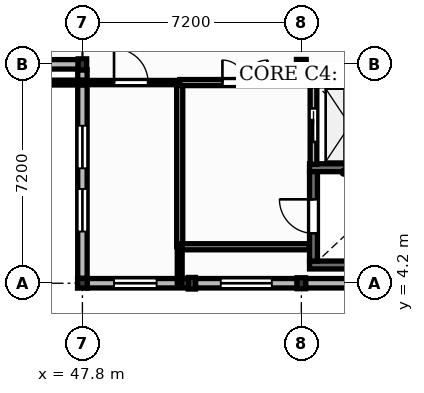
"""IFC4 building model, lengths in metres.
Left out: names, types, materials, properties, quantities, classifications, styles, units other than length and angle.
Written with IfcOpenShell. Run it as: python <this file> out.ifc"""

import sys

from ifc_helpers import new_model, si_unit, direction, frame, frame_2d, origin, origin_2d, place, context, subcontext, project, spatial, rectangle, extrude, element, fill, save


model = new_model("IFC4")
c1 = context("Model", 3, precision=1e-05, world=origin(), true_north=direction((0.0, 1.0)))
c2 = subcontext(c1, "Body", "Model", "MODEL_VIEW")
j1 = project(units=[si_unit("LENGTHUNIT", "METRE"), si_unit("PLANEANGLEUNIT", "RADIAN")], contexts=[c1])
p1 = place(None, origin())
s1 = spatial("IfcSite", under=j1, at=p1, CompositionType="ELEMENT")
p2 = place(p1, origin())
s2 = spatial("IfcBuilding", under=s1, at=p2, CompositionType="ELEMENT")
p3 = place(p2, frame((0.0, 0.0, 9.0)))
s3 = spatial("IfcBuildingStorey", under=s2, at=p3, CompositionType="ELEMENT", Elevation=9.0)
p4 = place(p3, frame((47.8, 4.2, 0.0), z_axis=(0.0, 0.0, 1.0), x_axis=(1.0, 0.0, 0.0)))
e1 = element("IfcColumn", 1, at=p4, inside=s3, PredefinedType="COLUMN", context=c2, shape_type="SweptSolid", body=[
    extrude(rectangle(XDim=0.32, YDim=0.32, at=origin_2d()), origin(), (0.0, 0.0, 1.0), 3.99),
])
p5 = place(p3, frame((47.8, 11.4, 0.0), z_axis=(0.0, 0.0, 1.0), x_axis=(1.0, 0.0, 0.0)))
e2 = element("IfcColumn", 2, at=p5, inside=s3, PredefinedType="COLUMN", context=c2, shape_type="SweptSolid", body=[
    extrude(rectangle(XDim=0.28, YDim=0.36, at=origin_2d()), origin(), (0.0, 0.0, 1.0), 3.98),
])
p6 = place(p3, frame((55.0, 4.2, 0.0), z_axis=(0.0, 0.0, 1.0), x_axis=(1.0, 0.0, 0.0)))
e3 = element("IfcColumn", 3, at=p6, inside=s3, PredefinedType="COLUMN", context=c2, shape_type="SweptSolid", body=[
    extrude(rectangle(XDim=0.28, YDim=0.36, at=origin_2d()), origin(), (0.0, 0.0, 1.0), 3.99),
])
p7 = place(p3, frame((55.0, 11.4, 0.0), z_axis=(0.0, 0.0, 1.0), x_axis=(1.0, 0.0, 0.0)))
e4 = element("IfcColumn", 4, at=p7, inside=s3, PredefinedType="COLUMN", context=c2, shape_type="SweptSolid", body=[
    extrude(rectangle(XDim=0.32, YDim=0.32, at=origin_2d()), origin(), (0.0, 0.0, 1.0), 3.99),
])
p8 = place(p3, frame((51.4, 4.2, 0.0), z_axis=(0.0, 0.0, 1.0), x_axis=(1.0, 0.0, 0.0)))
e5 = element("IfcColumn", 5, at=p8, inside=s3, PredefinedType="PILASTER", context=c2, shape_type="SweptSolid", body=[
    extrude(rectangle(XDim=0.24, YDim=0.38, at=origin_2d()), origin(), (0.0, 0.0, 1.0), 3.99),
])
p9 = place(p3, frame((40.76, 11.4, 0.0), z_axis=(0.0, 0.0, 1.0), x_axis=(1.0, 0.0, 0.0)))
e6 = element("IfcWall", 6, at=p9, inside=s3, PredefinedType="SOLIDWALL", context=c2, shape_type="SweptSolid", body=[
    extrude(rectangle(XDim=6.9, YDim=0.31, at=frame_2d((3.45, 0.0))), origin(), (0.0, 0.0, 1.0), 3.49),
])
p10 = place(p9, frame((1.45, 0.0, 1.0)))
e7 = element("IfcOpeningElement", 7, at=p10, cuts=e6, PredefinedType="OPENING", context=c2, shape_type="SweptSolid", body=[
    extrude(rectangle(XDim=1.66, YDim=1.8, at=frame_2d((0.83, 0.9))), frame((0.0, 0.165, 0.0), z_axis=(0.0, -1.0, 0.0), x_axis=(1.0, 0.0, 0.0)), (0.0, 0.0, 1.0), 0.33),
])
p11 = place(p9, frame((3.79, 0.0, 1.0)))
e8 = element("IfcOpeningElement", 8, at=p11, cuts=e6, PredefinedType="OPENING", context=c2, shape_type="SweptSolid", body=[
    extrude(rectangle(XDim=1.66, YDim=1.8, at=frame_2d((0.83, 0.9))), frame((0.0, 0.165, 0.0), z_axis=(0.0, -1.0, 0.0), x_axis=(1.0, 0.0, 0.0)), (0.0, 0.0, 1.0), 0.33),
])
p12 = place(p3, frame((47.96, 4.2, 0.0), z_axis=(0.0, 0.0, 1.0), x_axis=(1.0, 0.0, 0.0)))
e9 = element("IfcWall", 9, at=p12, inside=s3, PredefinedType="SOLIDWALL", context=c2, shape_type="SweptSolid", body=[
    extrude(rectangle(XDim=3.32, YDim=0.31, at=frame_2d((1.66, 0.0))), origin(), (0.0, 0.0, 1.0), 3.53),
])
p13 = place(p12, frame((0.88, 0.0, 1.05)))
e10 = element("IfcOpeningElement", 10, at=p13, cuts=e9, PredefinedType="OPENING", context=c2, shape_type="SweptSolid", body=[
    extrude(rectangle(XDim=1.4, YDim=1.65, at=frame_2d((0.7, 0.825))), frame((0.0, 0.165, 0.0), z_axis=(0.0, -1.0, 0.0), x_axis=(1.0, 0.0, 0.0)), (0.0, 0.0, 1.0), 0.33),
])
p14 = place(p3, frame((51.52, 4.2, 0.0), z_axis=(0.0, 0.0, 1.0), x_axis=(1.0, 0.0, 0.0)))
e11 = element("IfcWall", 11, at=p14, inside=s3, PredefinedType="SOLIDWALL", context=c2, shape_type="SweptSolid", body=[
    extrude(rectangle(XDim=3.34, YDim=0.31, at=frame_2d((1.67, 0.0))), origin(), (0.0, 0.0, 1.0), 3.53),
])
p15 = place(p14, frame((0.83, 0.0, 1.5)))
e12 = element("IfcOpeningElement", 12, at=p15, cuts=e11, PredefinedType="OPENING", context=c2, shape_type="SweptSolid", body=[
    extrude(rectangle(XDim=1.68, YDim=1.25, at=frame_2d((0.84, 0.625))), frame((0.0, 0.165, 0.0), z_axis=(0.0, -1.0, 0.0), x_axis=(1.0, 0.0, 0.0)), (0.0, 0.0, 1.0), 0.33),
])
p16 = place(p3, frame((47.8, 4.36, 0.0), z_axis=(0.0, 0.0, 1.0), x_axis=(0.0, 1.0, 0.0)))
e13 = element("IfcWall", 13, at=p16, inside=s3, PredefinedType="SOLIDWALL", context=c2, shape_type="SweptSolid", body=[
    extrude(rectangle(XDim=6.86, YDim=0.31, at=frame_2d((3.43, 0.0))), origin(), (0.0, 0.0, 1.0), 3.52),
])
p17 = place(p16, frame((1.54, 0.0, 1.05)))
e14 = element("IfcOpeningElement", 14, at=p17, cuts=e13, PredefinedType="OPENING", context=c2, shape_type="SweptSolid", body=[
    extrude(rectangle(XDim=1.4, YDim=1.65, at=frame_2d((0.7, 0.825))), frame((0.0, 0.165, 0.0), z_axis=(0.0, -1.0, 0.0), x_axis=(1.0, 0.0, 0.0)), (0.0, 0.0, 1.0), 0.33),
])
p18 = place(p16, frame((3.62, 0.0, 1.05)))
e15 = element("IfcOpeningElement", 15, at=p18, cuts=e13, PredefinedType="OPENING", context=c2, shape_type="SweptSolid", body=[
    extrude(rectangle(XDim=1.4, YDim=1.65, at=frame_2d((0.7, 0.825))), frame((0.0, 0.165, 0.0), z_axis=(0.0, -1.0, 0.0), x_axis=(1.0, 0.0, 0.0)), (0.0, 0.0, 1.0), 0.33),
])
p19 = place(p3, frame((55.14, 4.2, 0.0), z_axis=(0.0, 0.0, 1.0), x_axis=(1.0, 0.0, 0.0)))
e16 = element("IfcWall", 16, at=p19, inside=s3, PredefinedType="SOLIDWALL", context=c2, shape_type="SweptSolid", body=[
    extrude(rectangle(XDim=3.34, YDim=0.31, at=frame_2d((1.67, 0.0))), origin(), (0.0, 0.0, 1.0), 3.53),
])
for number, where, z_axis, x_axis in (
    (17, (55.27, 4.8, 0.0), (0.0, 0.0, 1.0), (1.0, 0.0, 0.0)),
    (18, (55.27, 8.0, 0.0), (0.0, 0.0, 1.0), (1.0, 0.0, 0.0)),
):
    element("IfcWall", number, at=place(p3, frame(where, z_axis=z_axis, x_axis=x_axis)), inside=s3, PredefinedType="SHEAR", context=c2, shape_type="SweptSolid", body=[
        extrude(rectangle(XDim=6.66, YDim=0.26, at=frame_2d((3.33, 0.0))), origin(), (0.0, 0.0, 1.0), 3.95),
    ])
p20 = place(p3, frame((55.4, 4.93, 0.0), z_axis=(0.0, 0.0, 1.0), x_axis=(0.0, 1.0, 0.0)))
e19 = element("IfcWall", 19, at=p20, inside=s3, PredefinedType="SHEAR", context=c2, shape_type="SweptSolid", body=[
    extrude(rectangle(XDim=2.94, YDim=0.26, at=frame_2d((1.47, 0.0))), origin(), (0.0, 0.0, 1.0), 3.95),
])
p21 = place(p20, frame((0.91, 0.0, 0.0)))
e20 = element("IfcOpeningElement", 20, at=p21, cuts=e19, PredefinedType="OPENING", context=c2, shape_type="SweptSolid", body=[
    extrude(rectangle(XDim=1.12, YDim=2.1, at=frame_2d((0.56, 1.05))), frame((0.0, 0.14, 0.0), z_axis=(0.0, -1.0, 0.0), x_axis=(1.0, 0.0, 0.0)), (0.0, 0.0, 1.0), 0.28),
])
p22 = place(p3, frame((55.4, 10.8, 0.0), z_axis=(0.0, 0.0, 1.0), x_axis=(1.0, 0.0, 0.0)))
e21 = element("IfcWall", 21, at=p22, inside=s3, PredefinedType="SOLIDWALL", context=c2, shape_type="SweptSolid", body=[
    extrude(rectangle(XDim=2.4, YDim=0.22, at=frame_2d((1.2, 0.0))), origin(), (0.0, 0.0, 1.0), 3.95),
])
p23 = place(p3, frame((55.4, 8.11, 0.0), z_axis=(0.0, 0.0, 1.0), x_axis=(0.0, 1.0, 0.0)))
e22 = element("IfcWall", 22, at=p23, inside=s3, PredefinedType="SOLIDWALL", context=c2, shape_type="SweptSolid", body=[
    extrude(rectangle(XDim=2.58, YDim=0.22, at=frame_2d((1.29, 0.0))), origin(), (0.0, 0.0, 1.0), 3.95),
])
p24 = place(p23, frame((0.74, 0.0, 0.0)))
e23 = element("IfcOpeningElement", 23, at=p24, cuts=e22, PredefinedType="OPENING", context=c2, shape_type="SweptSolid", body=[
    extrude(rectangle(XDim=1.1, YDim=2.15, at=frame_2d((0.55, 1.075))), frame((0.0, 0.12, 0.0), z_axis=(0.0, -1.0, 0.0), x_axis=(1.0, 0.0, 0.0)), (0.0, 0.0, 1.0), 0.24),
])
p25 = place(p3, frame((47.8, 10.8, 0.0), z_axis=(0.0, 0.0, 1.0), x_axis=(1.0, 0.0, 0.0)))
e24 = element("IfcWall", 24, at=p25, inside=s3, PredefinedType="PARTITIONING", context=c2, shape_type="SweptSolid", body=[
    extrude(rectangle(XDim=3.2, YDim=0.14, at=frame_2d((1.6, 0.0))), origin(), (0.0, 0.0, 1.0), 3.96),
])
p26 = place(p25, frame((1.04, 0.0, 0.0)))
e25 = element("IfcOpeningElement", 25, at=p26, cuts=e24, PredefinedType="OPENING", context=c2, shape_type="SweptSolid", body=[
    extrude(rectangle(XDim=1.12, YDim=2.15, at=frame_2d((0.56, 1.075))), frame((0.0, 0.08, 0.0), z_axis=(0.0, -1.0, 0.0), x_axis=(1.0, 0.0, 0.0)), (0.0, 0.0, 1.0), 0.16),
])
p27 = place(p3, frame((51.0, 5.4, 0.0), z_axis=(0.0, 0.0, 1.0), x_axis=(0.0, 1.0, 0.0)))
e26 = element("IfcWall", 26, at=p27, inside=s3, PredefinedType="PARTITIONING", context=c2, shape_type="SweptSolid", body=[
    extrude(rectangle(XDim=5.33, YDim=0.2, at=frame_2d((2.665, 0.0))), origin(), (0.0, 0.0, 1.0), 3.96),
])
p28 = place(p3, frame((51.0, 10.8, 0.0), z_axis=(0.0, 0.0, 1.0), x_axis=(1.0, 0.0, 0.0)))
e27 = element("IfcWall", 27, at=p28, inside=s3, PredefinedType="PARTITIONING", context=c2, shape_type="SweptSolid", body=[
    extrude(rectangle(XDim=4.29, YDim=0.2, at=frame_2d((2.145, 0.0))), origin(), (0.0, 0.0, 1.0), 3.96),
])
p29 = place(p28, frame((1.405, 0.0, 0.0)))
e28 = element("IfcOpeningElement", 28, at=p29, cuts=e27, PredefinedType="OPENING", context=c2, shape_type="SweptSolid", body=[
    extrude(rectangle(XDim=1.48, YDim=2.25, at=frame_2d((0.74, 1.125))), frame((0.0, 0.11, 0.0), z_axis=(0.0, -1.0, 0.0), x_axis=(1.0, 0.0, 0.0)), (0.0, 0.0, 1.0), 0.22),
])
p30 = place(p3, frame((51.0, 5.4, 0.0), z_axis=(0.0, 0.0, 1.0), x_axis=(1.0, 0.0, 0.0)))
e29 = element("IfcWall", 29, at=p30, inside=s3, PredefinedType="PARTITIONING", context=c2, shape_type="SweptSolid", body=[
    extrude(rectangle(XDim=4.26, YDim=0.2, at=frame_2d((2.13, 0.0))), origin(), (0.0, 0.0, 1.0), 3.96),
])
p31 = place(p3, frame((40.6, 10.8, 0.0), z_axis=(0.0, 0.0, 1.0), x_axis=(1.0, 0.0, 0.0)))
e30 = element("IfcWall", 30, at=p31, inside=s3, PredefinedType="PARTITIONING", context=c2, shape_type="SweptSolid", body=[
    extrude(rectangle(XDim=7.2, YDim=0.16, at=frame_2d((3.6, 0.0))), origin(), (0.0, 0.0, 1.0), 3.96),
])
p32 = place(p3, frame((51.0, 4.2, 0.0), z_axis=(0.0, 0.0, 1.0), x_axis=(0.0, 1.0, 0.0)))
e31 = element("IfcWall", 31, at=p32, inside=s3, PredefinedType="PARTITIONING", context=c2, shape_type="SweptSolid", body=[
    extrude(rectangle(XDim=1.2, YDim=0.16, at=frame_2d((0.6, 0.0))), origin(), (0.0, 0.0, 1.0), 3.96),
])
p33 = place(p13, origin())
e32 = element("IfcWindow", 32, at=p33, inside=s3, PartitioningType="SINGLE_PANEL", PredefinedType="WINDOW", context=c2, shape_type="SweptSolid", body=[
    extrude(rectangle(XDim=1.4, YDim=1.65, at=frame_2d((0.7, 0.825))), frame((0.0, 0.03, 0.0), z_axis=(0.0, -1.0, 0.0), x_axis=(1.0, 0.0, 0.0)), (0.0, 0.0, 1.0), 0.06),
])
fill(e10, e32)
p34 = place(p15, origin())
e33 = element("IfcWindow", 33, at=p34, inside=s3, PartitioningType="DOUBLE_PANEL_VERTICAL", PredefinedType="WINDOW", context=c2, shape_type="SweptSolid", body=[
    extrude(rectangle(XDim=1.68, YDim=1.25, at=frame_2d((0.84, 0.625))), frame((0.0, 0.03, 0.0), z_axis=(0.0, -1.0, 0.0), x_axis=(1.0, 0.0, 0.0)), (0.0, 0.0, 1.0), 0.06),
])
fill(e12, e33)
p35 = place(p17, origin())
e34 = element("IfcWindow", 34, at=p35, inside=s3, PartitioningType="SINGLE_PANEL", PredefinedType="WINDOW", context=c2, shape_type="SweptSolid", body=[
    extrude(rectangle(XDim=1.4, YDim=1.65, at=frame_2d((0.7, 0.825))), frame((0.0, 0.03, 0.0), z_axis=(0.0, -1.0, 0.0), x_axis=(1.0, 0.0, 0.0)), (0.0, 0.0, 1.0), 0.06),
])
fill(e14, e34)
p36 = place(p18, origin())
e35 = element("IfcWindow", 35, at=p36, inside=s3, PartitioningType="SINGLE_PANEL", PredefinedType="WINDOW", context=c2, shape_type="SweptSolid", body=[
    extrude(rectangle(XDim=1.4, YDim=1.65, at=frame_2d((0.7, 0.825))), frame((0.0, 0.03, 0.0), z_axis=(0.0, -1.0, 0.0), x_axis=(1.0, 0.0, 0.0)), (0.0, 0.0, 1.0), 0.06),
])
fill(e15, e35)
p37 = place(p24, origin())
e36 = element("IfcDoor", 36, at=p37, inside=s3, OperationType="SLIDING_TO_LEFT", PredefinedType="DOOR", context=c2, shape_type="SweptSolid", body=[
    extrude(rectangle(XDim=1.1, YDim=2.15, at=frame_2d((0.55, 1.075))), frame((0.0, 0.025, 0.0), z_axis=(0.0, -1.0, 0.0), x_axis=(1.0, 0.0, 0.0)), (0.0, 0.0, 1.0), 0.05),
])
fill(e23, e36)
p38 = place(p21, origin())
e37 = element("IfcDoor", 37, at=p38, inside=s3, OperationType="SINGLE_SWING_RIGHT", PredefinedType="DOOR", context=c2, shape_type="SweptSolid", body=[
    extrude(rectangle(XDim=1.12, YDim=2.1, at=frame_2d((0.56, 1.05))), frame((0.0, 0.025, 0.0), z_axis=(0.0, -1.0, 0.0), x_axis=(1.0, 0.0, 0.0)), (0.0, 0.0, 1.0), 0.05),
])
fill(e20, e37)
p39 = place(p29, origin())
e38 = element("IfcDoor", 38, at=p39, inside=s3, OperationType="DOUBLE_DOOR_SINGLE_SWING", PredefinedType="DOOR", context=c2, shape_type="SweptSolid", body=[
    extrude(rectangle(XDim=1.48, YDim=2.25, at=frame_2d((0.74, 1.125))), frame((0.0, 0.025, 0.0), z_axis=(0.0, -1.0, 0.0), x_axis=(1.0, 0.0, 0.0)), (0.0, 0.0, 1.0), 0.05),
])
fill(e28, e38)
p40 = place(p26, origin())
e39 = element("IfcDoor", 39, at=p40, inside=s3, OperationType="SINGLE_SWING_LEFT", PredefinedType="DOOR", context=c2, shape_type="SweptSolid", body=[
    extrude(rectangle(XDim=1.12, YDim=2.15, at=frame_2d((0.56, 1.075))), frame((0.0, 0.025, 0.0), z_axis=(0.0, -1.0, 0.0), x_axis=(1.0, 0.0, 0.0)), (0.0, 0.0, 1.0), 0.05),
])
fill(e25, e39)
save(model, sys.argv[1])
